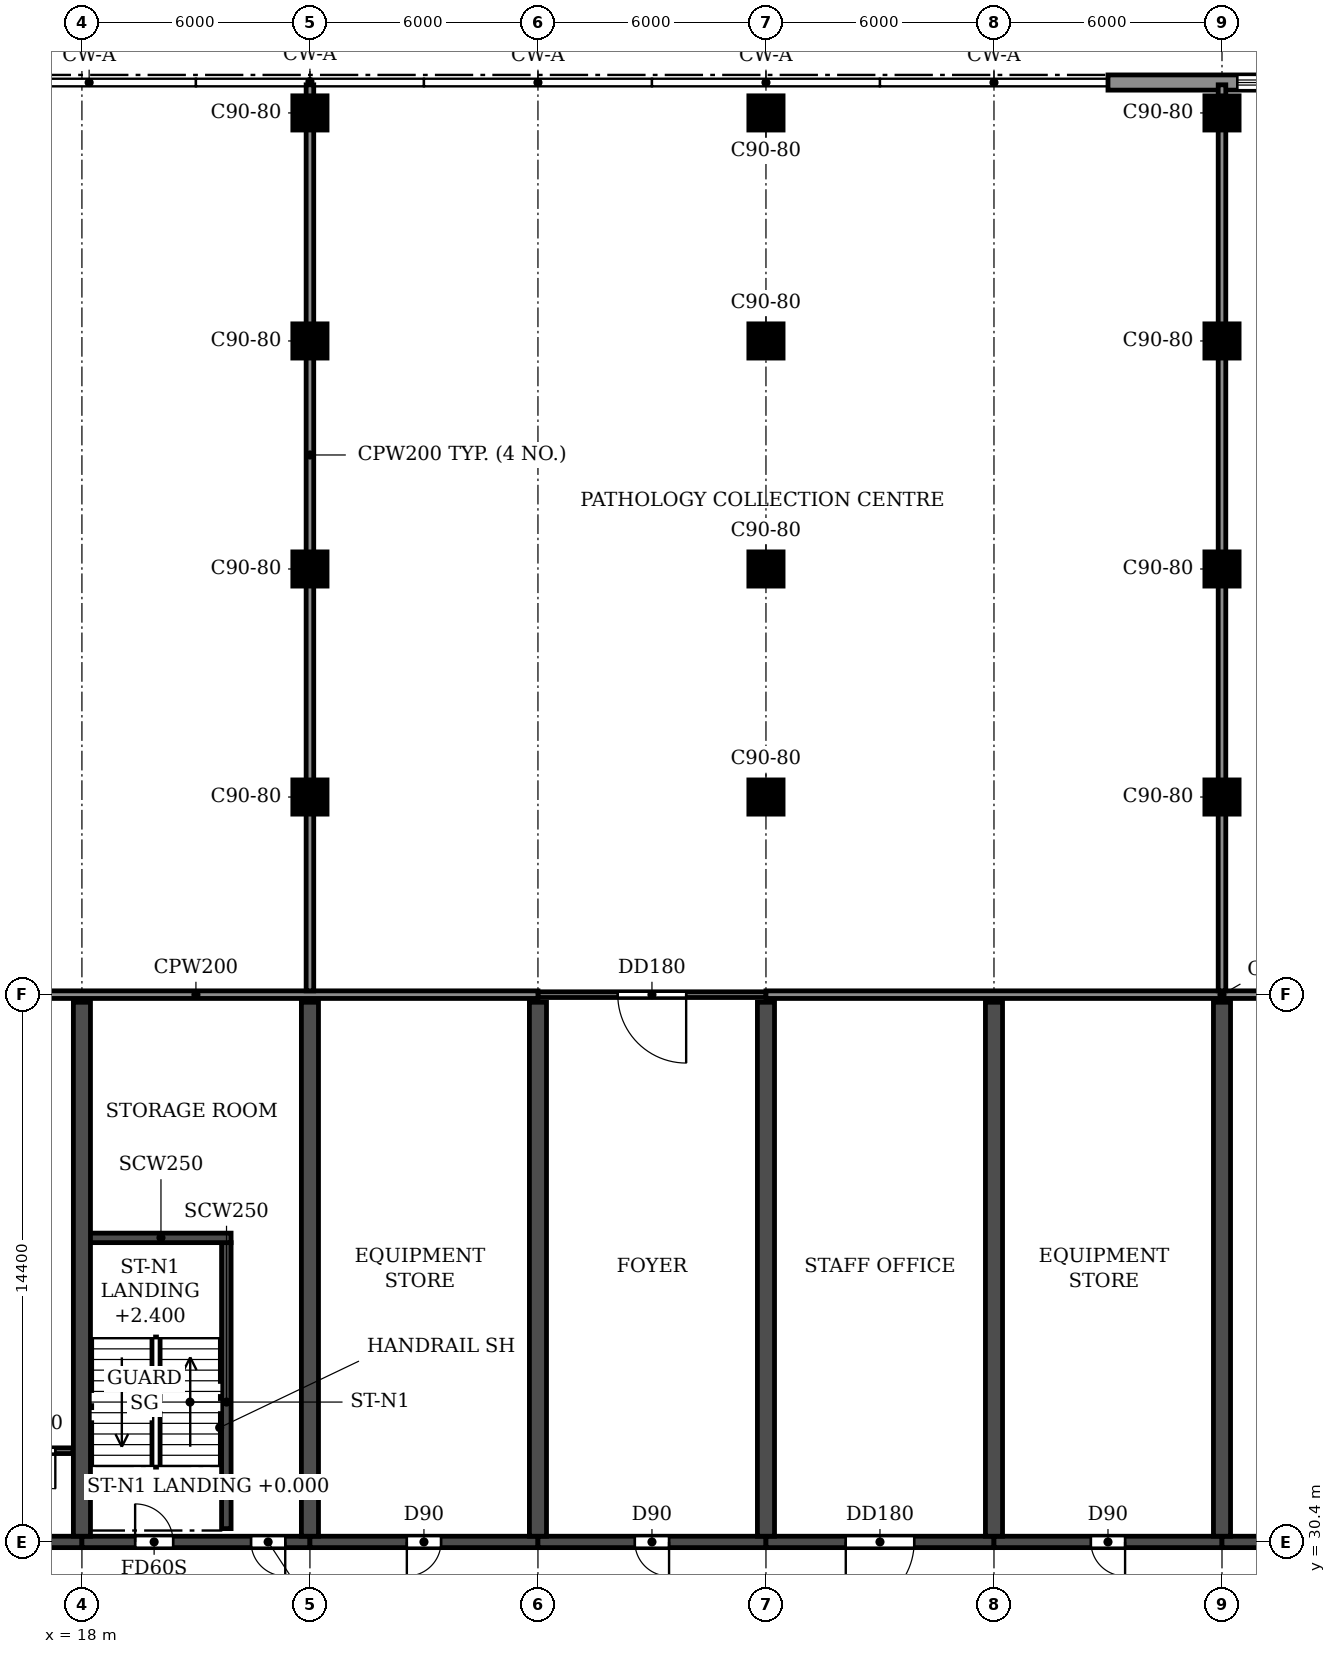
"""IFC4 building model, lengths in metres.
Left out: names, types, materials, properties, quantities, classifications, styles, units other than length and angle.
Written with IfcOpenShell. Run it as: python <this file> out.ifc"""

import sys

from ifc_helpers import new_model, si_unit, direction, frame, frame_2d, origin, origin_2d, place, context, subcontext, project, spatial, rectangle, extrude, source, transform, mapped, element, fill, save


model = new_model("IFC4")
c1 = context("Model", 3, precision=1e-05, world=origin(), true_north=direction((0.0, 1.0)))
c2 = subcontext(c1, "Body", "Model", "MODEL_VIEW")
j1 = project(units=[si_unit("LENGTHUNIT", "METRE"), si_unit("PLANEANGLEUNIT", "RADIAN")], contexts=[c1])
p1 = place(None, origin())
s1 = spatial("IfcSite", under=j1, at=p1, CompositionType="ELEMENT")
p2 = place(p1, origin())
s2 = spatial("IfcBuilding", under=s1, at=p2, CompositionType="ELEMENT")
p3 = place(p2, frame((0.0, 0.0, 6.0)))
s3 = spatial("IfcBuildingStorey", under=s2, at=p3, CompositionType="ELEMENT", Elevation=6.0)
for number, where, z_axis, x_axis in (
    (1, (18.0, 30.55, 0.0), (0.0, 0.0, 1.0), (0.0, 1.0, 0.0)),
    (2, (24.0, 30.55, 0.0), (0.0, 0.0, 1.0), (0.0, 1.0, 0.0)),
    (3, (30.0, 30.55, 0.0), (0.0, 0.0, 1.0), (0.0, 1.0, 0.0)),
    (4, (36.0, 30.55, 0.0), (0.0, 0.0, 1.0), (0.0, 1.0, 0.0)),
    (5, (42.0, 30.55, 0.0), (0.0, 0.0, 1.0), (0.0, 1.0, 0.0)),
    (6, (48.0, 30.55, 0.0), (0.0, 0.0, 1.0), (0.0, 1.0, 0.0)),
):
    element("IfcWall", number, at=place(p3, frame(where, z_axis=z_axis, x_axis=x_axis)), inside=s3, PredefinedType="SHEAR", context=c2, shape_type="SweptSolid", body=[
        extrude(rectangle(XDim=14.05, YDim=0.45, at=frame_2d((7.025, 0.0))), origin(), (0.0, 0.0, 1.0), 4.52),
    ])
p4 = place(p3, frame((12.0, 30.4, 0.0), z_axis=(0.0, 0.0, 1.0), x_axis=(1.0, 0.0, 0.0)))
e7 = element("IfcWall", 7, at=p4, inside=s3, PredefinedType="SHEAR", context=c2, shape_type="SweptSolid", body=[
    extrude(rectangle(XDim=6.0, YDim=0.3, at=frame_2d((3.0, 0.0))), origin(), (0.0, 0.0, 1.0), 3.92),
])
p5 = place(p4, frame((2.55, 0.0, 0.0)))
e8 = element("IfcOpeningElement", 8, at=p5, cuts=e7, PredefinedType="OPENING", context=c2, shape_type="SweptSolid", body=[
    extrude(rectangle(XDim=0.9, YDim=2.1, at=frame_2d((0.45, 1.05))), frame((0.0, 0.16, 0.0), z_axis=(0.0, -1.0, 0.0), x_axis=(1.0, 0.0, 0.0)), (0.0, 0.0, 1.0), 0.32),
])
p6 = place(p3, frame((18.0, 30.4, 0.0), z_axis=(0.0, 0.0, 1.0), x_axis=(1.0, 0.0, 0.0)))
e9 = element("IfcWall", 9, at=p6, inside=s3, PredefinedType="SHEAR", context=c2, shape_type="SweptSolid", body=[
    extrude(rectangle(XDim=6.0, YDim=0.3, at=frame_2d((3.0, 0.0))), origin(), (0.0, 0.0, 1.0), 3.92),
])
p7 = place(p6, frame((1.4, 0.0, 0.0)))
e10 = element("IfcOpeningElement", 10, at=p7, cuts=e9, PredefinedType="OPENING", context=c2, shape_type="SweptSolid", body=[
    extrude(rectangle(XDim=1.0, YDim=2.1, at=frame_2d((0.5, 1.05))), frame((0.0, 0.16, 0.0), z_axis=(0.0, -1.0, 0.0), x_axis=(1.0, 0.0, 0.0)), (0.0, 0.0, 1.0), 0.32),
])
p8 = place(p6, frame((4.45, 0.0, 0.0)))
e11 = element("IfcOpeningElement", 11, at=p8, cuts=e9, PredefinedType="OPENING", context=c2, shape_type="SweptSolid", body=[
    extrude(rectangle(XDim=0.9, YDim=2.1, at=frame_2d((0.45, 1.05))), frame((0.0, 0.16, 0.0), z_axis=(0.0, -1.0, 0.0), x_axis=(1.0, 0.0, 0.0)), (0.0, 0.0, 1.0), 0.32),
])
p9 = place(p3, frame((24.0, 30.4, 0.0), z_axis=(0.0, 0.0, 1.0), x_axis=(1.0, 0.0, 0.0)))
e12 = element("IfcWall", 12, at=p9, inside=s3, PredefinedType="SHEAR", context=c2, shape_type="SweptSolid", body=[
    extrude(rectangle(XDim=6.0, YDim=0.3, at=frame_2d((3.0, 0.0))), origin(), (0.0, 0.0, 1.0), 3.92),
])
p10 = place(p9, frame((2.55, 0.0, 0.0)))
e13 = element("IfcOpeningElement", 13, at=p10, cuts=e12, PredefinedType="OPENING", context=c2, shape_type="SweptSolid", body=[
    extrude(rectangle(XDim=0.9, YDim=2.1, at=frame_2d((0.45, 1.05))), frame((0.0, 0.16, 0.0), z_axis=(0.0, -1.0, 0.0), x_axis=(1.0, 0.0, 0.0)), (0.0, 0.0, 1.0), 0.32),
])
p11 = place(p3, frame((30.0, 30.4, 0.0), z_axis=(0.0, 0.0, 1.0), x_axis=(1.0, 0.0, 0.0)))
e14 = element("IfcWall", 14, at=p11, inside=s3, PredefinedType="SHEAR", context=c2, shape_type="SweptSolid", body=[
    extrude(rectangle(XDim=6.0, YDim=0.3, at=frame_2d((3.0, 0.0))), origin(), (0.0, 0.0, 1.0), 3.92),
])
p12 = place(p11, frame((2.55, 0.0, 0.0)))
e15 = element("IfcOpeningElement", 15, at=p12, cuts=e14, PredefinedType="OPENING", context=c2, shape_type="SweptSolid", body=[
    extrude(rectangle(XDim=0.9, YDim=2.1, at=frame_2d((0.45, 1.05))), frame((0.0, 0.16, 0.0), z_axis=(0.0, -1.0, 0.0), x_axis=(1.0, 0.0, 0.0)), (0.0, 0.0, 1.0), 0.32),
])
p13 = place(p3, frame((36.0, 30.4, 0.0), z_axis=(0.0, 0.0, 1.0), x_axis=(1.0, 0.0, 0.0)))
e16 = element("IfcWall", 16, at=p13, inside=s3, PredefinedType="SHEAR", context=c2, shape_type="SweptSolid", body=[
    extrude(rectangle(XDim=6.0, YDim=0.3, at=frame_2d((3.0, 0.0))), origin(), (0.0, 0.0, 1.0), 3.92),
])
p14 = place(p13, frame((2.1, 0.0, 0.0)))
e17 = element("IfcOpeningElement", 17, at=p14, cuts=e16, PredefinedType="OPENING", context=c2, shape_type="SweptSolid", body=[
    extrude(rectangle(XDim=1.8, YDim=2.1, at=frame_2d((0.9, 1.05))), frame((0.0, 0.16, 0.0), z_axis=(0.0, -1.0, 0.0), x_axis=(1.0, 0.0, 0.0)), (0.0, 0.0, 1.0), 0.32),
])
p15 = place(p3, frame((42.0, 30.4, 0.0), z_axis=(0.0, 0.0, 1.0), x_axis=(1.0, 0.0, 0.0)))
e18 = element("IfcWall", 18, at=p15, inside=s3, PredefinedType="SHEAR", context=c2, shape_type="SweptSolid", body=[
    extrude(rectangle(XDim=6.0, YDim=0.3, at=frame_2d((3.0, 0.0))), origin(), (0.0, 0.0, 1.0), 3.92),
])
p16 = place(p15, frame((2.55, 0.0, 0.0)))
e19 = element("IfcOpeningElement", 19, at=p16, cuts=e18, PredefinedType="OPENING", context=c2, shape_type="SweptSolid", body=[
    extrude(rectangle(XDim=0.9, YDim=2.1, at=frame_2d((0.45, 1.05))), frame((0.0, 0.16, 0.0), z_axis=(0.0, -1.0, 0.0), x_axis=(1.0, 0.0, 0.0)), (0.0, 0.0, 1.0), 0.32),
])
p17 = place(p3, frame((48.0, 30.4, 0.0), z_axis=(0.0, 0.0, 1.0), x_axis=(1.0, 0.0, 0.0)))
e20 = element("IfcWall", 20, at=p17, inside=s3, PredefinedType="SHEAR", context=c2, shape_type="SweptSolid", body=[
    extrude(rectangle(XDim=6.0, YDim=0.3, at=frame_2d((3.0, 0.0))), origin(), (0.0, 0.0, 1.0), 3.92),
])
p18 = place(p17, frame((2.1, 0.0, 0.0)))
e21 = element("IfcOpeningElement", 21, at=p18, cuts=e20, PredefinedType="OPENING", context=c2, shape_type="SweptSolid", body=[
    extrude(rectangle(XDim=1.8, YDim=2.1, at=frame_2d((0.9, 1.05))), frame((0.0, 0.16, 0.0), z_axis=(0.0, -1.0, 0.0), x_axis=(1.0, 0.0, 0.0)), (0.0, 0.0, 1.0), 0.32),
])
m1 = source(origin(), c2, "Body", "SweptSolid", [
    extrude(rectangle(XDim=0.9, YDim=0.9, at=origin_2d()), origin(), (0.0, 0.0, 1.0), 4.52),
])
for number, where, z_axis, x_axis in (
    (22, (24.0, 68.0, 0.0), (0.0, 0.0, 1.0), (1.0, 0.0, 0.0)),
    (23, (36.0, 68.0, 0.0), (0.0, 0.0, 1.0), (1.0, 0.0, 0.0)),
    (24, (48.0, 68.0, 0.0), (0.0, 0.0, 1.0), (1.0, 0.0, 0.0)),
    (25, (24.0, 62.0, 0.0), (0.0, 0.0, 1.0), (1.0, 0.0, 0.0)),
    (26, (36.0, 62.0, 0.0), (0.0, 0.0, 1.0), (1.0, 0.0, 0.0)),
    (27, (48.0, 62.0, 0.0), (0.0, 0.0, 1.0), (1.0, 0.0, 0.0)),
    (28, (24.0, 56.0, 0.0), (0.0, 0.0, 1.0), (1.0, 0.0, 0.0)),
    (29, (36.0, 56.0, 0.0), (0.0, 0.0, 1.0), (1.0, 0.0, 0.0)),
    (30, (48.0, 56.0, 0.0), (0.0, 0.0, 1.0), (1.0, 0.0, 0.0)),
    (31, (24.0, 50.0, 0.0), (0.0, 0.0, 1.0), (1.0, 0.0, 0.0)),
    (32, (36.0, 50.0, 0.0), (0.0, 0.0, 1.0), (1.0, 0.0, 0.0)),
    (33, (48.0, 50.0, 0.0), (0.0, 0.0, 1.0), (1.0, 0.0, 0.0)),
):
    element("IfcColumn", number, at=place(p3, frame(where, z_axis=z_axis, x_axis=x_axis)), inside=s3, PredefinedType="COLUMN", context=c2, shape_type="MappedRepresentation", body=[
        mapped(m1, transform((0.0, 0.0, 0.0))),
    ])
p19 = place(p3, frame((21.8, 30.75, 0.0), z_axis=(0.0, 0.0, 1.0), x_axis=(0.0, 1.0, 0.0)))
e34 = element("IfcWall", 34, at=p19, inside=s3, PredefinedType="SOLIDWALL", context=c2, shape_type="SweptSolid", body=[
    extrude(rectangle(XDim=7.525, YDim=0.25, at=frame_2d((3.762, 0.0))), origin(), (0.0, 0.0, 1.0), 4.52),
])
p20 = place(p3, frame((18.0, 38.4, 0.0), z_axis=(0.0, 0.0, 1.0), x_axis=(1.0, 0.0, 0.0)))
e35 = element("IfcWall", 35, at=p20, inside=s3, PredefinedType="SOLIDWALL", context=c2, shape_type="SweptSolid", body=[
    extrude(rectangle(XDim=3.925, YDim=0.25, at=frame_2d((1.962, 0.0))), origin(), (0.0, 0.0, 1.0), 4.52),
])
p21 = place(p3, frame((105.0, 68.8, 0.0), z_axis=(0.0, 0.0, 1.0), x_axis=(-1.0, 0.0, 0.0)))
e36 = element("IfcWall", 36, at=p21, inside=s3, PredefinedType="STANDARD", context=c2, shape_type="SweptSolid", body=[
    extrude(rectangle(XDim=60.0, YDim=0.4, at=frame_2d((30.0, 0.0))), origin(), (0.0, 0.0, 1.0), 4.52),
])
p22 = place(p21, frame((54.4, 0.0, 0.9)))
e37 = element("IfcOpeningElement", 37, at=p22, cuts=e36, PredefinedType="OPENING", context=c2, shape_type="SweptSolid", body=[
    extrude(rectangle(XDim=2.2, YDim=2.7, at=frame_2d((1.1, 1.35))), frame((0.0, 0.21, 0.0), z_axis=(0.0, -1.0, 0.0), x_axis=(1.0, 0.0, 0.0)), (0.0, 0.0, 1.0), 0.42),
])
p23 = place(p21, frame((51.4, 0.0, 0.9)))
e38 = element("IfcOpeningElement", 38, at=p23, cuts=e36, PredefinedType="OPENING", context=c2, shape_type="SweptSolid", body=[
    extrude(rectangle(XDim=2.2, YDim=2.7, at=frame_2d((1.1, 1.35))), frame((0.0, 0.21, 0.0), z_axis=(0.0, -1.0, 0.0), x_axis=(1.0, 0.0, 0.0)), (0.0, 0.0, 1.0), 0.42),
])
p24 = place(p21, frame((48.4, 0.0, 0.9)))
e39 = element("IfcOpeningElement", 39, at=p24, cuts=e36, PredefinedType="OPENING", context=c2, shape_type="SweptSolid", body=[
    extrude(rectangle(XDim=2.2, YDim=2.7, at=frame_2d((1.1, 1.35))), frame((0.0, 0.21, 0.0), z_axis=(0.0, -1.0, 0.0), x_axis=(1.0, 0.0, 0.0)), (0.0, 0.0, 1.0), 0.42),
])
p25 = place(p21, frame((45.4, 0.0, 0.9)))
e40 = element("IfcOpeningElement", 40, at=p25, cuts=e36, PredefinedType="OPENING", context=c2, shape_type="SweptSolid", body=[
    extrude(rectangle(XDim=2.2, YDim=2.7, at=frame_2d((1.1, 1.35))), frame((0.0, 0.21, 0.0), z_axis=(0.0, -1.0, 0.0), x_axis=(1.0, 0.0, 0.0)), (0.0, 0.0, 1.0), 0.42),
])
p26 = place(p21, frame((42.4, 0.0, 0.9)))
e41 = element("IfcOpeningElement", 41, at=p26, cuts=e36, PredefinedType="OPENING", context=c2, shape_type="SweptSolid", body=[
    extrude(rectangle(XDim=2.2, YDim=2.7, at=frame_2d((1.1, 1.35))), frame((0.0, 0.21, 0.0), z_axis=(0.0, -1.0, 0.0), x_axis=(1.0, 0.0, 0.0)), (0.0, 0.0, 1.0), 0.42),
])
p27 = place(p21, frame((39.4, 0.0, 0.9)))
e42 = element("IfcOpeningElement", 42, at=p27, cuts=e36, PredefinedType="OPENING", context=c2, shape_type="SweptSolid", body=[
    extrude(rectangle(XDim=2.2, YDim=2.7, at=frame_2d((1.1, 1.35))), frame((0.0, 0.21, 0.0), z_axis=(0.0, -1.0, 0.0), x_axis=(1.0, 0.0, 0.0)), (0.0, 0.0, 1.0), 0.42),
])
p28 = place(p21, frame((36.4, 0.0, 0.9)))
e43 = element("IfcOpeningElement", 43, at=p28, cuts=e36, PredefinedType="OPENING", context=c2, shape_type="SweptSolid", body=[
    extrude(rectangle(XDim=2.2, YDim=2.7, at=frame_2d((1.1, 1.35))), frame((0.0, 0.21, 0.0), z_axis=(0.0, -1.0, 0.0), x_axis=(1.0, 0.0, 0.0)), (0.0, 0.0, 1.0), 0.42),
])
p29 = place(p21, frame((33.4, 0.0, 0.9)))
e44 = element("IfcOpeningElement", 44, at=p29, cuts=e36, PredefinedType="OPENING", context=c2, shape_type="SweptSolid", body=[
    extrude(rectangle(XDim=2.2, YDim=2.7, at=frame_2d((1.1, 1.35))), frame((0.0, 0.21, 0.0), z_axis=(0.0, -1.0, 0.0), x_axis=(1.0, 0.0, 0.0)), (0.0, 0.0, 1.0), 0.42),
])
p30 = place(p3, frame((12.235, 32.8, 0.0), z_axis=(0.0, 0.0, 1.0), x_axis=(1.0, 0.0, 0.0)))
e45 = element("IfcWall", 45, at=p30, inside=s3, PredefinedType="PARTITIONING", context=c2, shape_type="SweptSolid", body=[
    extrude(rectangle(XDim=5.53, YDim=0.15, at=frame_2d((2.765, 0.0))), origin(), (0.0, 0.0, 1.0), 4.52),
])
p31 = place(p30, frame((1.065, 0.0, 0.0)))
e46 = element("IfcOpeningElement", 46, at=p31, cuts=e45, PredefinedType="OPENING", context=c2, shape_type="SweptSolid", body=[
    extrude(rectangle(XDim=1.0, YDim=2.1, at=frame_2d((0.5, 1.05))), frame((0.0, 0.085, 0.0), z_axis=(0.0, -1.0, 0.0), x_axis=(1.0, 0.0, 0.0)), (0.0, 0.0, 1.0), 0.17),
])
p32 = place(p30, frame((4.065, 0.0, 0.0)))
e47 = element("IfcOpeningElement", 47, at=p32, cuts=e45, PredefinedType="OPENING", context=c2, shape_type="SweptSolid", body=[
    extrude(rectangle(XDim=1.0, YDim=2.1, at=frame_2d((0.5, 1.05))), frame((0.0, 0.085, 0.0), z_axis=(0.0, -1.0, 0.0), x_axis=(1.0, 0.0, 0.0)), (0.0, 0.0, 1.0), 0.17),
])
p33 = place(p3, frame((30.0, 44.8, 0.0), z_axis=(0.0, 0.0, 1.0), x_axis=(1.0, 0.0, 0.0)))
e48 = element("IfcWall", 48, at=p33, inside=s3, PredefinedType="PARTITIONING", context=c2, shape_type="SweptSolid", body=[
    extrude(rectangle(XDim=6.0, YDim=0.15, at=frame_2d((3.0, 0.0))), origin(), (0.0, 0.0, 1.0), 4.52),
])
p34 = place(p33, frame((2.1, 0.0, 0.0)))
e49 = element("IfcOpeningElement", 49, at=p34, cuts=e48, PredefinedType="OPENING", context=c2, shape_type="SweptSolid", body=[
    extrude(rectangle(XDim=1.8, YDim=2.1, at=frame_2d((0.9, 1.05))), frame((0.0, 0.085, 0.0), z_axis=(0.0, -1.0, 0.0), x_axis=(1.0, 0.0, 0.0)), (0.0, 0.0, 1.0), 0.17),
])
p35 = place(p3, frame((12.0, 44.8, 0.0), z_axis=(0.0, 0.0, 1.0), x_axis=(1.0, 0.0, 0.0)))
e50 = element("IfcWall", 50, at=p35, inside=s3, PredefinedType="PARTITIONING", context=c2, shape_type="SweptSolid", body=[
    extrude(rectangle(XDim=18.0, YDim=0.2, at=frame_2d((9.0, 0.0))), origin(), (0.0, 0.0, 1.0), 4.52),
])
p36 = place(p3, frame((36.0, 44.8, 0.0), z_axis=(0.0, 0.0, 1.0), x_axis=(1.0, 0.0, 0.0)))
e51 = element("IfcWall", 51, at=p36, inside=s3, PredefinedType="PARTITIONING", context=c2, shape_type="SweptSolid", body=[
    extrude(rectangle(XDim=24.0, YDim=0.2, at=frame_2d((12.0, 0.0))), origin(), (0.0, 0.0, 1.0), 4.52),
])
for number, where, z_axis, x_axis in (
    (52, (24.0, 44.9, 0.0), (0.0, 0.0, 1.0), (0.0, 1.0, 0.0)),
    (53, (48.0, 44.9, 0.0), (0.0, 0.0, 1.0), (0.0, 1.0, 0.0)),
):
    element("IfcWall", number, at=place(p3, frame(where, z_axis=z_axis, x_axis=x_axis)), inside=s3, PredefinedType="PARTITIONING", context=c2, shape_type="SweptSolid", body=[
        extrude(rectangle(XDim=23.84, YDim=0.2, at=frame_2d((11.92, 0.0))), origin(), (0.0, 0.0, 1.0), 4.52),
    ])
p37 = place(p22, origin())
e54 = element("IfcWindow", 54, at=p37, inside=s3, PartitioningType="DOUBLE_PANEL_HORIZONTAL", PredefinedType="WINDOW", context=c2, shape_type="SweptSolid", body=[
    extrude(rectangle(XDim=2.2, YDim=2.7, at=frame_2d((1.1, 1.35))), frame((0.0, 0.03, 0.0), z_axis=(0.0, -1.0, 0.0), x_axis=(1.0, 0.0, 0.0)), (0.0, 0.0, 1.0), 0.06),
])
fill(e37, e54)
p38 = place(p7, origin())
e55 = element("IfcDoor", 55, at=p38, inside=s3, OperationType="SINGLE_SWING_LEFT", PredefinedType="DOOR", context=c2, shape_type="SweptSolid", body=[
    extrude(rectangle(XDim=1.0, YDim=2.1, at=frame_2d((0.5, 1.05))), frame((0.0, 0.025, 0.0), z_axis=(0.0, -1.0, 0.0), x_axis=(1.0, 0.0, 0.0)), (0.0, 0.0, 1.0), 0.05),
])
fill(e10, e55)
p39 = place(p8, frame((0.9, 0.0, 0.0), z_axis=(0.0, 0.0, 1.0), x_axis=(-1.0, 0.0, 0.0)))
e56 = element("IfcDoor", 56, at=p39, inside=s3, OperationType="SINGLE_SWING_LEFT", PredefinedType="DOOR", context=c2, shape_type="SweptSolid", body=[
    extrude(rectangle(XDim=0.9, YDim=2.1, at=frame_2d((0.45, 1.05))), frame((0.0, 0.025, 0.0), z_axis=(0.0, -1.0, 0.0), x_axis=(1.0, 0.0, 0.0)), (0.0, 0.0, 1.0), 0.05),
])
fill(e11, e56)
p40 = place(p10, frame((0.9, 0.0, 0.0), z_axis=(0.0, 0.0, 1.0), x_axis=(-1.0, 0.0, 0.0)))
e57 = element("IfcDoor", 57, at=p40, inside=s3, OperationType="SINGLE_SWING_RIGHT", PredefinedType="DOOR", context=c2, shape_type="SweptSolid", body=[
    extrude(rectangle(XDim=0.9, YDim=2.1, at=frame_2d((0.45, 1.05))), frame((0.0, 0.025, 0.0), z_axis=(0.0, -1.0, 0.0), x_axis=(1.0, 0.0, 0.0)), (0.0, 0.0, 1.0), 0.05),
])
fill(e13, e57)
p41 = place(p12, frame((0.9, 0.0, 0.0), z_axis=(0.0, 0.0, 1.0), x_axis=(-1.0, 0.0, 0.0)))
e58 = element("IfcDoor", 58, at=p41, inside=s3, OperationType="SINGLE_SWING_LEFT", PredefinedType="DOOR", context=c2, shape_type="SweptSolid", body=[
    extrude(rectangle(XDim=0.9, YDim=2.1, at=frame_2d((0.45, 1.05))), frame((0.0, 0.025, 0.0), z_axis=(0.0, -1.0, 0.0), x_axis=(1.0, 0.0, 0.0)), (0.0, 0.0, 1.0), 0.05),
])
fill(e15, e58)
p42 = place(p14, frame((1.8, 0.0, 0.0), z_axis=(0.0, 0.0, 1.0), x_axis=(-1.0, 0.0, 0.0)))
e59 = element("IfcDoor", 59, at=p42, inside=s3, OperationType="DOUBLE_DOOR_SINGLE_SWING", PredefinedType="DOOR", context=c2, shape_type="SweptSolid", body=[
    extrude(rectangle(XDim=1.8, YDim=2.1, at=frame_2d((0.9, 1.05))), frame((0.0, 0.025, 0.0), z_axis=(0.0, -1.0, 0.0), x_axis=(1.0, 0.0, 0.0)), (0.0, 0.0, 1.0), 0.05),
])
fill(e17, e59)
p43 = place(p16, frame((0.9, 0.0, 0.0), z_axis=(0.0, 0.0, 1.0), x_axis=(-1.0, 0.0, 0.0)))
e60 = element("IfcDoor", 60, at=p43, inside=s3, OperationType="SINGLE_SWING_LEFT", PredefinedType="DOOR", context=c2, shape_type="SweptSolid", body=[
    extrude(rectangle(XDim=0.9, YDim=2.1, at=frame_2d((0.45, 1.05))), frame((0.0, 0.025, 0.0), z_axis=(0.0, -1.0, 0.0), x_axis=(1.0, 0.0, 0.0)), (0.0, 0.0, 1.0), 0.05),
])
fill(e19, e60)
p44 = place(p32, frame((1.0, 0.0, 0.0), z_axis=(0.0, 0.0, 1.0), x_axis=(-1.0, 0.0, 0.0)))
e61 = element("IfcDoor", 61, at=p44, inside=s3, OperationType="SINGLE_SWING_LEFT", PredefinedType="DOOR", context=c2, shape_type="SweptSolid", body=[
    extrude(rectangle(XDim=1.0, YDim=2.1, at=frame_2d((0.5, 1.05))), frame((0.0, 0.025, 0.0), z_axis=(0.0, -1.0, 0.0), x_axis=(1.0, 0.0, 0.0)), (0.0, 0.0, 1.0), 0.05),
])
fill(e47, e61)
p45 = place(p34, frame((1.8, 0.0, 0.0), z_axis=(0.0, 0.0, 1.0), x_axis=(-1.0, 0.0, 0.0)))
e62 = element("IfcDoor", 62, at=p45, inside=s3, OperationType="DOUBLE_DOOR_SINGLE_SWING", PredefinedType="DOOR", context=c2, shape_type="SweptSolid", body=[
    extrude(rectangle(XDim=1.8, YDim=2.1, at=frame_2d((0.9, 1.05))), frame((0.0, 0.025, 0.0), z_axis=(0.0, -1.0, 0.0), x_axis=(1.0, 0.0, 0.0)), (0.0, 0.0, 1.0), 0.05),
])
fill(e49, e62)
save(model, sys.argv[1])
